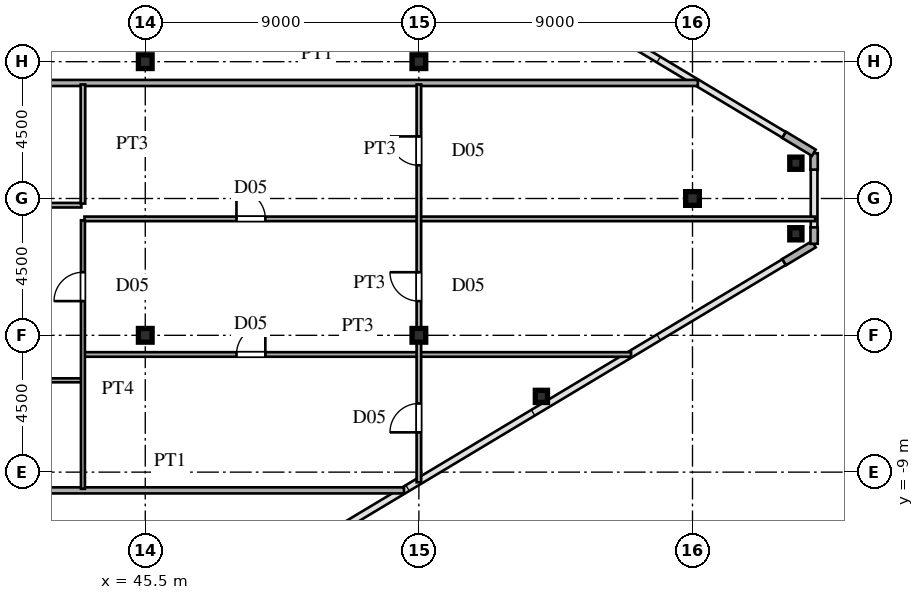
"""IFC4 building model, lengths in metres.
Left out: names, types, materials, properties, quantities, classifications, styles, units other than length and angle.
Written with IfcOpenShell. Run it as: python <this file> out.ifc"""

import sys

from ifc_helpers import new_model, si_unit, direction, frame, frame_2d, origin, origin_2d, place, context, subcontext, project, spatial, rectangle, hollow_rectangle, i_section, extrude, source, transform, mapped, element, fill, save


model = new_model("IFC4")
c1 = context("Model", 3, precision=1e-05, world=origin(), true_north=direction((0.0, 1.0)))
c2 = subcontext(c1, "Body", "Model", "MODEL_VIEW")
j1 = project(units=[si_unit("LENGTHUNIT", "METRE"), si_unit("PLANEANGLEUNIT", "RADIAN")], contexts=[c1])
p1 = place(None, origin())
s1 = spatial("IfcSite", under=j1, at=p1, CompositionType="ELEMENT")
p2 = place(p1, origin())
s2 = spatial("IfcBuilding", under=s1, at=p2, CompositionType="ELEMENT")
p3 = place(p2, frame((0.0, 0.0, 261.9)))
s3 = spatial("IfcBuildingStorey", under=s2, at=p3, CompositionType="ELEMENT", Elevation=261.9)
m1 = source(origin(), c2, "Body", "SweptSolid", [
    extrude(i_section(OverallWidth=0.45, OverallDepth=0.45, WebThickness=0.016, FlangeThickness=0.025, at=origin_2d()), origin(), (0.0, 0.0, 1.0), 3.75),
])
for number, where, z_axis, x_axis in (
    (1, (45.5, -4.5, 0.0), (0.0, 0.0, 1.0), (1.0, 0.0, 0.0)),
    (2, (45.5, 4.5, 0.0), (0.0, 0.0, 1.0), (1.0, 0.0, 0.0)),
    (3, (54.5, -4.5, 0.0), (0.0, 0.0, 1.0), (1.0, 0.0, 0.0)),
    (4, (54.5, 4.5, 0.0), (0.0, 0.0, 1.0), (1.0, 0.0, 0.0)),
    (5, (63.5, 0.0, 0.0), (0.0, 0.0, 1.0), (1.0, 0.0, 0.0)),
):
    element("IfcColumn", number, at=place(p3, frame(where, z_axis=z_axis, x_axis=x_axis)), inside=s3, PredefinedType="COLUMN", context=c2, shape_type="MappedRepresentation", body=[
        mapped(m1, transform((0.0, 0.0, 0.0), scale=1.0)),
    ])
m2 = source(origin(), c2, "Body", "SweptSolid", [
    extrude(hollow_rectangle(XDim=0.4, YDim=0.4, WallThickness=0.016, at=origin_2d()), origin(), (0.0, 0.0, 1.0), 3.75),
])
for number, where, z_axis, x_axis in (
    (6, (66.9, -1.16, 0.0), (0.0, 0.0, 1.0), (1.0, 0.0, 0.0)),
    (7, (66.9, 1.16, 0.0), (0.0, 0.0, 1.0), (1.0, 0.0, 0.0)),
    (8, (58.53, -6.509, 0.0), (0.0, 0.0, 1.0), (1.0, 0.0, 0.0)),
):
    element("IfcColumn", number, at=place(p3, frame(where, z_axis=z_axis, x_axis=x_axis)), inside=s3, PredefinedType="COLUMN", context=c2, shape_type="MappedRepresentation", body=[
        mapped(m2, transform((0.0, 0.0, 0.0), scale=1.0)),
    ])
p4 = place(p3, frame((66.514, -2.092, 0.0), z_axis=(0.0, 0.0, 1.0), x_axis=(0.85743623509, 0.514590228002, 0.0)))
e9 = element("IfcWall", 9, at=p4, inside=s3, PredefinedType="SOLIDWALL", context=c2, shape_type="SweptSolid", body=[
    extrude(rectangle(XDim=1.14, YDim=0.24, at=frame_2d((0.57, 0.0))), origin(), (0.0, 0.0, 1.0), 3.53),
])
for number, where, z_axis, x_axis in (
    (10, (67.5, -1.49, 0.0), (0.0, 0.0, 1.0), (0.0, 1.0, 0.0)),
    (11, (67.5, 0.95, 0.0), (0.0, 0.0, 1.0), (0.0, 1.0, 0.0)),
):
    element("IfcWall", number, at=place(p3, frame(where, z_axis=z_axis, x_axis=x_axis)), inside=s3, PredefinedType="SOLIDWALL", context=c2, shape_type="SweptSolid", body=[
        extrude(rectangle(XDim=0.54, YDim=0.24, at=frame_2d((0.27, 0.0))), origin(), (0.0, 0.0, 1.0), 3.53),
    ])
p5 = place(p3, frame((67.491, 1.505, 0.0), z_axis=(0.0, 0.0, 1.0), x_axis=(-0.85743623509, 0.514590228002, 0.0)))
e12 = element("IfcWall", 12, at=p5, inside=s3, PredefinedType="SOLIDWALL", context=c2, shape_type="SweptSolid", body=[
    extrude(rectangle(XDim=1.14, YDim=0.24, at=frame_2d((0.57, 0.0))), origin(), (0.0, 0.0, 1.0), 3.53),
])
p6 = place(p3, frame((38.63, -9.6, 0.0), z_axis=(0.0, 0.0, 1.0), x_axis=(1.0, 0.0, 0.0)))
e13 = element("IfcWall", 13, at=p6, inside=s3, PredefinedType="PARTITIONING", context=c2, shape_type="SweptSolid", body=[
    extrude(rectangle(XDim=15.38, YDim=0.2, at=frame_2d((7.69, 0.0))), origin(), (0.0, 0.0, 1.0), 3.53),
])
p7 = place(p3, frame((38.6, -5.98, 0.0), z_axis=(0.0, 0.0, 1.0), x_axis=(1.0, 0.0, 0.0)))
e14 = element("IfcWall", 14, at=p7, inside=s3, PredefinedType="PARTITIONING", context=c2, shape_type="SweptSolid", body=[
    extrude(rectangle(XDim=4.8, YDim=0.13, at=frame_2d((2.4, 0.0))), origin(), (0.0, 0.0, 1.0), 3.53),
])
p8 = place(p7, frame((1.96, 0.0, 0.0)))
e15 = element("IfcOpeningElement", 15, at=p8, cuts=e14, PredefinedType="OPENING", context=c2, shape_type="SweptSolid", body=[
    extrude(rectangle(XDim=0.88, YDim=2.1, at=frame_2d((0.44, 1.05))), frame((0.0, 0.075, 0.0), z_axis=(0.0, -1.0, 0.0), x_axis=(1.0, 0.0, 0.0)), (0.0, 0.0, 1.0), 0.15),
])
p9 = place(p3, frame((43.5, -5.13, 0.0), z_axis=(0.0, 0.0, 1.0), x_axis=(1.0, 0.0, 0.0)))
e16 = element("IfcWall", 16, at=p9, inside=s3, PredefinedType="PARTITIONING", context=c2, shape_type="SweptSolid", body=[
    extrude(rectangle(XDim=17.98, YDim=0.15, at=frame_2d((8.99, 0.0))), origin(), (0.0, 0.0, 1.0), 3.53),
])
p10 = place(p9, frame((5.0, 0.0, 0.0)))
e17 = element("IfcOpeningElement", 17, at=p10, cuts=e16, PredefinedType="OPENING", context=c2, shape_type="SweptSolid", body=[
    extrude(rectangle(XDim=0.95, YDim=2.15, at=frame_2d((0.475, 1.075))), frame((0.0, 0.085, 0.0), z_axis=(0.0, -1.0, 0.0), x_axis=(1.0, 0.0, 0.0)), (0.0, 0.0, 1.0), 0.17),
])
p11 = place(p3, frame((43.5, -0.67, 0.0), z_axis=(0.0, 0.0, 1.0), x_axis=(1.0, 0.0, 0.0)))
e18 = element("IfcWall", 18, at=p11, inside=s3, PredefinedType="PARTITIONING", context=c2, shape_type="SweptSolid", body=[
    extrude(rectangle(XDim=24.035, YDim=0.15, at=frame_2d((12.018, 0.0))), origin(), (0.0, 0.0, 1.0), 3.53),
])
p12 = place(p11, frame((5.0, 0.0, 0.0)))
e19 = element("IfcOpeningElement", 19, at=p12, cuts=e18, PredefinedType="OPENING", context=c2, shape_type="SweptSolid", body=[
    extrude(rectangle(XDim=0.95, YDim=2.15, at=frame_2d((0.475, 1.075))), frame((0.0, 0.085, 0.0), z_axis=(0.0, -1.0, 0.0), x_axis=(1.0, 0.0, 0.0)), (0.0, 0.0, 1.0), 0.17),
])
p13 = place(p3, frame((38.6, -0.22, 0.0), z_axis=(0.0, 0.0, 1.0), x_axis=(1.0, 0.0, 0.0)))
e20 = element("IfcWall", 20, at=p13, inside=s3, PredefinedType="PARTITIONING", context=c2, shape_type="SweptSolid", body=[
    extrude(rectangle(XDim=4.8, YDim=0.15, at=frame_2d((2.4, 0.0))), origin(), (0.0, 0.0, 1.0), 3.53),
])
p14 = place(p13, frame((1.925, 0.0, 0.0)))
e21 = element("IfcOpeningElement", 21, at=p14, cuts=e20, PredefinedType="OPENING", context=c2, shape_type="SweptSolid", body=[
    extrude(rectangle(XDim=0.95, YDim=2.15, at=frame_2d((0.475, 1.075))), frame((0.0, 0.085, 0.0), z_axis=(0.0, -1.0, 0.0), x_axis=(1.0, 0.0, 0.0)), (0.0, 0.0, 1.0), 0.17),
])
p15 = place(p3, frame((38.63, 3.8, 0.0), z_axis=(0.0, 0.0, 1.0), x_axis=(1.0, 0.0, 0.0)))
e22 = element("IfcWall", 22, at=p15, inside=s3, PredefinedType="PARTITIONING", context=c2, shape_type="SweptSolid", body=[
    extrude(rectangle(XDim=25.046, YDim=0.2, at=frame_2d((12.523, 0.0))), origin(), (0.0, 0.0, 1.0), 3.53),
])
p16 = place(p3, frame((43.45, -9.55, 0.0), z_axis=(0.0, 0.0, 1.0), x_axis=(0.0, 1.0, 0.0)))
e23 = element("IfcWall", 23, at=p16, inside=s3, PredefinedType="PARTITIONING", context=c2, shape_type="SweptSolid", body=[
    extrude(rectangle(XDim=8.833, YDim=0.13, at=frame_2d((4.417, 0.0))), origin(), (0.0, 0.0, 1.0), 3.53),
])
p17 = place(p16, frame((6.175, 0.0, 0.0)))
e24 = element("IfcOpeningElement", 24, at=p17, cuts=e23, PredefinedType="OPENING", context=c2, shape_type="SweptSolid", body=[
    extrude(rectangle(XDim=0.95, YDim=2.15, at=frame_2d((0.475, 1.075))), frame((0.0, 0.075, 0.0), z_axis=(0.0, -1.0, 0.0), x_axis=(1.0, 0.0, 0.0)), (0.0, 0.0, 1.0), 0.15),
])
p18 = place(p3, frame((43.45, -0.168, 0.0), z_axis=(0.0, 0.0, 1.0), x_axis=(0.0, 1.0, 0.0)))
e25 = element("IfcWall", 25, at=p18, inside=s3, PredefinedType="PARTITIONING", context=c2, shape_type="SweptSolid", body=[
    extrude(rectangle(XDim=3.918, YDim=0.15, at=frame_2d((1.959, 0.0))), origin(), (0.0, 0.0, 1.0), 3.53),
])
p19 = place(p3, frame((54.5, -9.335, 0.0), z_axis=(0.0, 0.0, 1.0), x_axis=(0.0, 1.0, 0.0)))
e26 = element("IfcWall", 26, at=p19, inside=s3, PredefinedType="PARTITIONING", context=c2, shape_type="SweptSolid", body=[
    extrude(rectangle(XDim=13.085, YDim=0.15, at=frame_2d((6.542, 0.0))), origin(), (0.0, 0.0, 1.0), 2.93),
])
p20 = place(p19, frame((5.96, 0.0, 0.0)))
e27 = element("IfcOpeningElement", 27, at=p20, cuts=e26, PredefinedType="OPENING", context=c2, shape_type="SweptSolid", body=[
    extrude(rectangle(XDim=0.95, YDim=2.15, at=frame_2d((0.475, 1.075))), frame((0.0, 0.085, 0.0), z_axis=(0.0, -1.0, 0.0), x_axis=(1.0, 0.0, 0.0)), (0.0, 0.0, 1.0), 0.17),
])
p21 = place(p19, frame((1.643, 0.0, 0.0)))
e28 = element("IfcOpeningElement", 28, at=p21, cuts=e26, PredefinedType="OPENING", context=c2, shape_type="SweptSolid", body=[
    extrude(rectangle(XDim=0.95, YDim=2.15, at=frame_2d((0.475, 1.075))), frame((0.0, 0.085, 0.0), z_axis=(0.0, -1.0, 0.0), x_axis=(1.0, 0.0, 0.0)), (0.0, 0.0, 1.0), 0.17),
])
p22 = place(p19, frame((10.427, 0.0, 0.0)))
e29 = element("IfcOpeningElement", 29, at=p22, cuts=e26, PredefinedType="OPENING", context=c2, shape_type="SweptSolid", body=[
    extrude(rectangle(XDim=0.95, YDim=2.15, at=frame_2d((0.475, 1.075))), frame((0.0, 0.085, 0.0), z_axis=(0.0, -1.0, 0.0), x_axis=(1.0, 0.0, 0.0)), (0.0, 0.0, 1.0), 0.17),
])
m3 = source(origin(), c2, "Body", "SweptSolid", [
    extrude(rectangle(XDim=0.95, YDim=2.15, at=frame_2d((0.475, 1.075))), frame((0.0, 0.025, 0.0), z_axis=(0.0, -1.0, 0.0), x_axis=(1.0, 0.0, 0.0)), (0.0, 0.0, 1.0), 0.05),
])
p23 = place(p10, origin())
e30 = element("IfcDoor", 30, at=p23, inside=s3, OperationType="SINGLE_SWING_RIGHT", PredefinedType="DOOR", context=c2, shape_type="MappedRepresentation", body=[
    mapped(m3, transform((0.0, 0.0, 0.0), scale=1.0)),
])
fill(e17, e30)
p24 = place(p12, origin())
e31 = element("IfcDoor", 31, at=p24, inside=s3, OperationType="SINGLE_SWING_LEFT", PredefinedType="DOOR", context=c2, shape_type="MappedRepresentation", body=[
    mapped(m3, transform((0.0, 0.0, 0.0), scale=1.0)),
])
fill(e19, e31)
p25 = place(p17, origin())
e32 = element("IfcDoor", 32, at=p25, inside=s3, OperationType="SINGLE_SWING_LEFT", PredefinedType="DOOR", context=c2, shape_type="MappedRepresentation", body=[
    mapped(m3, transform((0.0, 0.0, 0.0), scale=1.0)),
])
fill(e24, e32)
p26 = place(p20, origin())
e33 = element("IfcDoor", 33, at=p26, inside=s3, OperationType="SINGLE_SWING_RIGHT", PredefinedType="DOOR", context=c2, shape_type="MappedRepresentation", body=[
    mapped(m3, transform((0.0, 0.0, 0.0), scale=1.0)),
])
fill(e27, e33)
p27 = place(p21, origin())
e34 = element("IfcDoor", 34, at=p27, inside=s3, OperationType="SINGLE_SWING_LEFT", PredefinedType="DOOR", context=c2, shape_type="MappedRepresentation", body=[
    mapped(m3, transform((0.0, 0.0, 0.0), scale=1.0)),
])
fill(e28, e34)
p28 = place(p22, origin())
e35 = element("IfcDoor", 35, at=p28, inside=s3, OperationType="SINGLE_SWING_RIGHT", PredefinedType="DOOR", context=c2, shape_type="MappedRepresentation", body=[
    mapped(m3, transform((0.0, 0.0, 0.0), scale=1.0)),
])
fill(e29, e35)
save(model, sys.argv[1])
